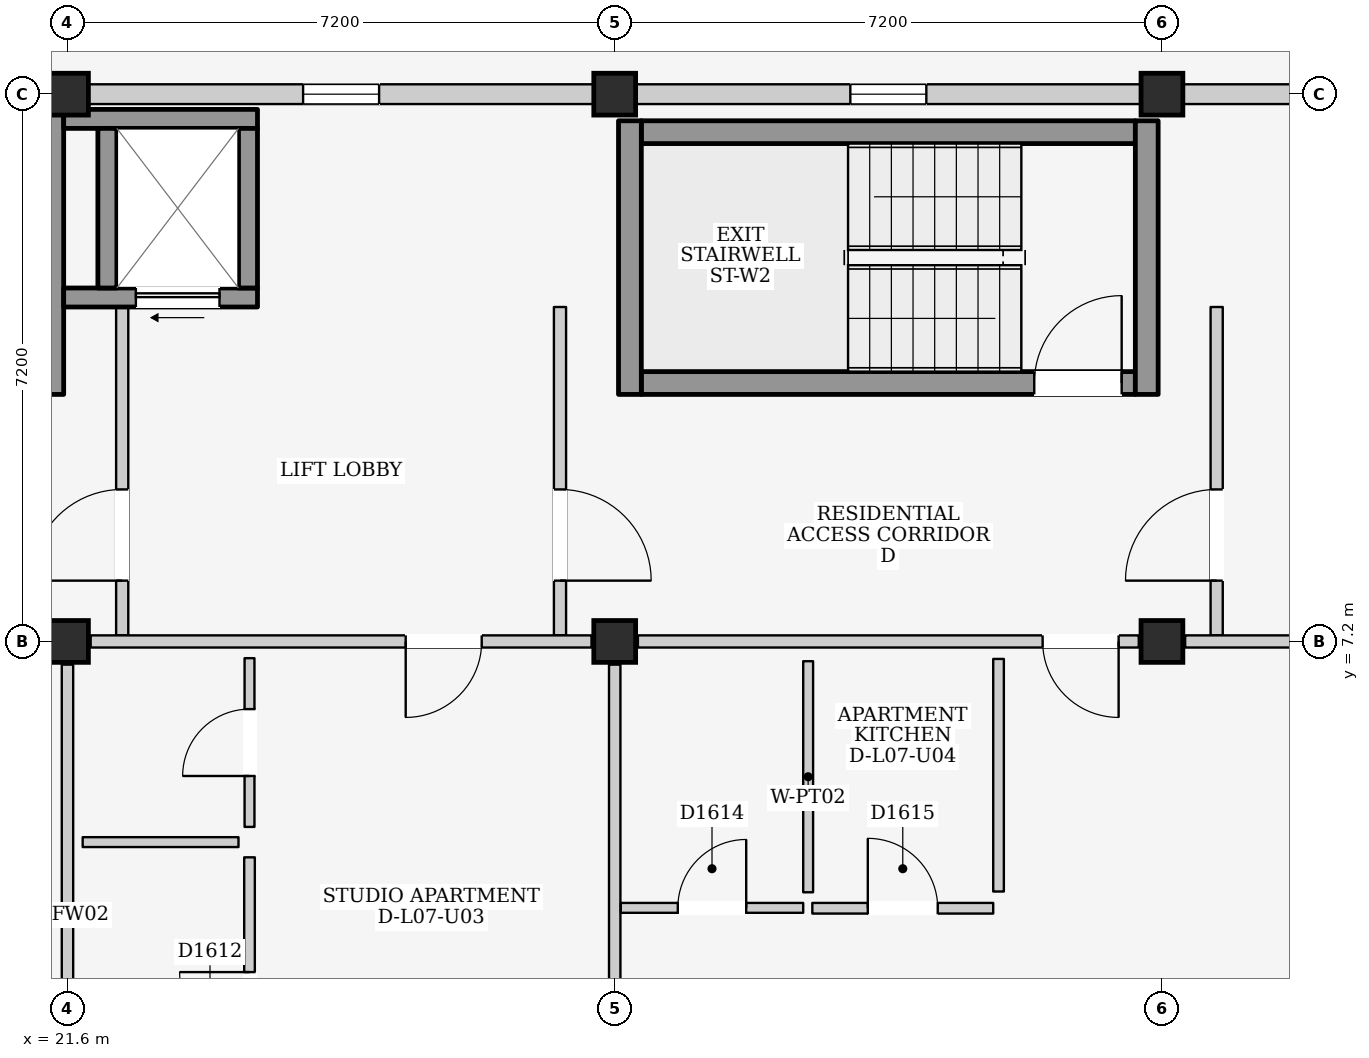
"""IFC4 building model, lengths in metres.
Left out: names, types, materials, properties, quantities, classifications, styles, units other than length and angle.
Written with IfcOpenShell. Run it as: python <this file> out.ifc"""

import sys

from ifc_helpers import new_model, si_unit, direction, frame, frame_2d, origin, origin_2d, place, context, subcontext, project, spatial, rectangle, extrude, element, fill, save


model = new_model("IFC4")
c1 = context("Model", 3, precision=1e-05, world=origin(), true_north=direction((0.0, 1.0)))
c2 = subcontext(c1, "Body", "Model", "MODEL_VIEW")
j1 = project(units=[si_unit("LENGTHUNIT", "METRE"), si_unit("PLANEANGLEUNIT", "RADIAN")], contexts=[c1])
p1 = place(None, origin())
s1 = spatial("IfcSite", under=j1, at=p1, CompositionType="ELEMENT")
p2 = place(p1, origin())
s2 = spatial("IfcBuilding", under=s1, at=p2, CompositionType="ELEMENT")
p3 = place(p2, frame((0.0, 0.0, 25.1)))
s3 = spatial("IfcBuildingStorey", under=s2, at=p3, CompositionType="ELEMENT", Elevation=25.1)
for number, where, z_axis, x_axis in (
    (1, (21.6, 7.2, 0.0), (0.0, 0.0, 1.0), (1.0, 0.0, 0.0)),
    (2, (21.6, 14.4, 0.0), (0.0, 0.0, 1.0), (1.0, 0.0, 0.0)),
    (3, (28.8, 7.2, 0.0), (0.0, 0.0, 1.0), (1.0, 0.0, 0.0)),
    (4, (28.8, 14.4, 0.0), (0.0, 0.0, 1.0), (1.0, 0.0, 0.0)),
    (5, (36.0, 7.2, 0.0), (0.0, 0.0, 1.0), (1.0, 0.0, 0.0)),
    (6, (36.0, 14.4, 0.0), (0.0, 0.0, 1.0), (1.0, 0.0, 0.0)),
):
    element("IfcColumn", number, at=place(p3, frame(where, z_axis=z_axis, x_axis=x_axis)), inside=s3, PredefinedType="COLUMN", context=c2, shape_type="SweptSolid", body=[
        extrude(rectangle(XDim=0.55, YDim=0.55, at=origin_2d()), origin(), (0.0, 0.0, 1.0), 3.2),
    ])
p4 = place(p3, frame((21.875, 14.4, 0.0), z_axis=(0.0, 0.0, 1.0), x_axis=(1.0, 0.0, 0.0)))
e7 = element("IfcWall", 7, at=p4, inside=s3, PredefinedType="ELEMENTEDWALL", context=c2, shape_type="SweptSolid", body=[
    extrude(rectangle(XDim=6.65, YDim=0.26, at=frame_2d((3.325, 0.0))), origin(), (0.0, 0.0, 1.0), 2.375),
])
p5 = place(p4, frame((2.825, 0.0, 1.2)))
e8 = element("IfcOpeningElement", 8, at=p5, cuts=e7, PredefinedType="OPENING", context=c2, shape_type="SweptSolid", body=[
    extrude(rectangle(XDim=1.0, YDim=0.9, at=frame_2d((0.5, 0.45))), frame((0.0, 0.145, 0.0), z_axis=(0.0, -1.0, 0.0), x_axis=(1.0, 0.0, 0.0)), (0.0, 0.0, 1.0), 0.29),
])
p6 = place(p3, frame((29.075, 14.4, 0.0), z_axis=(0.0, 0.0, 1.0), x_axis=(1.0, 0.0, 0.0)))
e9 = element("IfcWall", 9, at=p6, inside=s3, PredefinedType="ELEMENTEDWALL", context=c2, shape_type="SweptSolid", body=[
    extrude(rectangle(XDim=6.65, YDim=0.26, at=frame_2d((3.325, 0.0))), origin(), (0.0, 0.0, 1.0), 2.375),
])
p7 = place(p6, frame((2.825, 0.0, 1.2)))
e10 = element("IfcOpeningElement", 10, at=p7, cuts=e9, PredefinedType="OPENING", context=c2, shape_type="SweptSolid", body=[
    extrude(rectangle(XDim=1.0, YDim=0.9, at=frame_2d((0.5, 0.45))), frame((0.0, 0.145, 0.0), z_axis=(0.0, -1.0, 0.0), x_axis=(1.0, 0.0, 0.0)), (0.0, 0.0, 1.0), 0.29),
])
p8 = place(p3, frame((36.275, 14.4, 0.0), z_axis=(0.0, 0.0, 1.0), x_axis=(1.0, 0.0, 0.0)))
e11 = element("IfcWall", 11, at=p8, inside=s3, PredefinedType="ELEMENTEDWALL", context=c2, shape_type="SweptSolid", body=[
    extrude(rectangle(XDim=6.65, YDim=0.26, at=frame_2d((3.325, 0.0))), origin(), (0.0, 0.0, 1.0), 2.375),
])
p9 = place(p8, frame((2.825, 0.0, 1.2)))
e12 = element("IfcOpeningElement", 12, at=p9, cuts=e11, PredefinedType="OPENING", context=c2, shape_type="SweptSolid", body=[
    extrude(rectangle(XDim=1.0, YDim=0.9, at=frame_2d((0.5, 0.45))), frame((0.0, 0.145, 0.0), z_axis=(0.0, -1.0, 0.0), x_axis=(1.0, 0.0, 0.0)), (0.0, 0.0, 1.0), 0.29),
])
p10 = place(p3, frame((21.4, 10.45, 0.0), z_axis=(0.0, 0.0, 1.0), x_axis=(0.0, 1.0, 0.0)))
e13 = element("IfcWall", 13, at=p10, inside=s3, PredefinedType="SHEAR", context=c2, shape_type="SweptSolid", body=[
    extrude(rectangle(XDim=3.75, YDim=0.3, at=frame_2d((1.875, 0.0))), origin(), (0.0, 0.0, 1.0), 2.99),
])
p11 = place(p3, frame((22.32, 7.28, 0.0), z_axis=(0.0, 0.0, 1.0), x_axis=(0.0, 1.0, 0.0)))
e14 = element("IfcWall", 14, at=p11, inside=s3, PredefinedType="PARTITIONING", context=c2, shape_type="SweptSolid", body=[
    extrude(rectangle(XDim=4.32, YDim=0.16, at=frame_2d((2.16, 0.0))), origin(), (0.0, 0.0, 1.0), 2.99),
])
p12 = place(p11, frame((0.72, 0.0, 0.0)))
e15 = element("IfcOpeningElement", 15, at=p12, cuts=e14, PredefinedType="OPENING", context=c2, shape_type="SweptSolid", body=[
    extrude(rectangle(XDim=1.2, YDim=2.2, at=frame_2d((0.6, 1.1))), frame((0.0, 0.095, 0.0), z_axis=(0.0, -1.0, 0.0), x_axis=(1.0, 0.0, 0.0)), (0.0, 0.0, 1.0), 0.19),
])
p13 = place(p3, frame((28.08, 7.28, 0.0), z_axis=(0.0, 0.0, 1.0), x_axis=(0.0, 1.0, 0.0)))
e16 = element("IfcWall", 16, at=p13, inside=s3, PredefinedType="PARTITIONING", context=c2, shape_type="SweptSolid", body=[
    extrude(rectangle(XDim=4.32, YDim=0.16, at=frame_2d((2.16, 0.0))), origin(), (0.0, 0.0, 1.0), 2.99),
])
p14 = place(p13, frame((0.72, 0.0, 0.0)))
e17 = element("IfcOpeningElement", 17, at=p14, cuts=e16, PredefinedType="OPENING", context=c2, shape_type="SweptSolid", body=[
    extrude(rectangle(XDim=1.2, YDim=2.2, at=frame_2d((0.6, 1.1))), frame((0.0, 0.095, 0.0), z_axis=(0.0, -1.0, 0.0), x_axis=(1.0, 0.0, 0.0)), (0.0, 0.0, 1.0), 0.19),
])
p15 = place(p3, frame((21.55, 11.725, 0.0), z_axis=(0.0, 0.0, 1.0), x_axis=(1.0, 0.0, 0.0)))
e18 = element("IfcWall", 18, at=p15, inside=s3, PredefinedType="SHEAR", context=c2, shape_type="SweptSolid", body=[
    extrude(rectangle(XDim=2.55, YDim=0.25, at=frame_2d((1.275, 0.0))), origin(), (0.0, 0.0, 1.0), 2.99),
])
p16 = place(p15, frame((0.95, 0.0, 0.0)))
e19 = element("IfcOpeningElement", 19, at=p16, cuts=e18, PredefinedType="OPENING", context=c2, shape_type="SweptSolid", body=[
    extrude(rectangle(XDim=1.1, YDim=2.15, at=frame_2d((0.55, 1.075))), frame((0.0, 0.14, 0.0), z_axis=(0.0, -1.0, 0.0), x_axis=(1.0, 0.0, 0.0)), (0.0, 0.0, 1.0), 0.28),
])
p17 = place(p3, frame((21.55, 14.075, 0.0), z_axis=(0.0, 0.0, 1.0), x_axis=(1.0, 0.0, 0.0)))
e20 = element("IfcWall", 20, at=p17, inside=s3, PredefinedType="SHEAR", context=c2, shape_type="SweptSolid", body=[
    extrude(rectangle(XDim=2.55, YDim=0.25, at=frame_2d((1.275, 0.0))), origin(), (0.0, 0.0, 1.0), 2.99),
])
for number, where, z_axis, x_axis in (
    (21, (22.125, 11.85, 0.0), (0.0, 0.0, 1.0), (0.0, 1.0, 0.0)),
    (22, (23.975, 11.85, 0.0), (0.0, 0.0, 1.0), (0.0, 1.0, 0.0)),
):
    element("IfcWall", number, at=place(p3, frame(where, z_axis=z_axis, x_axis=x_axis)), inside=s3, PredefinedType="SHEAR", context=c2, shape_type="SweptSolid", body=[
        extrude(rectangle(XDim=2.1, YDim=0.25, at=frame_2d((1.05, 0.0))), origin(), (0.0, 0.0, 1.0), 2.99),
    ])
p18 = place(p3, frame((29.15, 10.6, 0.0), z_axis=(0.0, 0.0, 1.0), x_axis=(1.0, 0.0, 0.0)))
e23 = element("IfcWall", 23, at=p18, inside=s3, PredefinedType="SHEAR", context=c2, shape_type="SweptSolid", body=[
    extrude(rectangle(XDim=6.5, YDim=0.3, at=frame_2d((3.25, 0.0))), origin(), (0.0, 0.0, 1.0), 2.99),
])
p19 = place(p18, frame((5.17, 0.0, 0.0)))
e24 = element("IfcOpeningElement", 24, at=p19, cuts=e23, PredefinedType="OPENING", context=c2, shape_type="SweptSolid", body=[
    extrude(rectangle(XDim=1.15, YDim=2.2, at=frame_2d((0.575, 1.1))), frame((0.0, 0.165, 0.0), z_axis=(0.0, -1.0, 0.0), x_axis=(1.0, 0.0, 0.0)), (0.0, 0.0, 1.0), 0.33),
])
p20 = place(p3, frame((29.15, 13.9, 0.0), z_axis=(0.0, 0.0, 1.0), x_axis=(1.0, 0.0, 0.0)))
e25 = element("IfcWall", 25, at=p20, inside=s3, PredefinedType="SHEAR", context=c2, shape_type="SweptSolid", body=[
    extrude(rectangle(XDim=6.5, YDim=0.3, at=frame_2d((3.25, 0.0))), origin(), (0.0, 0.0, 1.0), 2.99),
])
for number, where, z_axis, x_axis in (
    (26, (29.0, 10.45, 0.0), (0.0, 0.0, 1.0), (0.0, 1.0, 0.0)),
    (27, (35.8, 10.45, 0.0), (0.0, 0.0, 1.0), (0.0, 1.0, 0.0)),
):
    element("IfcWall", number, at=place(p3, frame(where, z_axis=z_axis, x_axis=x_axis)), inside=s3, PredefinedType="SHEAR", context=c2, shape_type="SweptSolid", body=[
        extrude(rectangle(XDim=3.6, YDim=0.3, at=frame_2d((1.8, 0.0))), origin(), (0.0, 0.0, 1.0), 2.99),
    ])
p21 = place(p3, frame((36.72, 7.28, 0.0), z_axis=(0.0, 0.0, 1.0), x_axis=(0.0, 1.0, 0.0)))
e28 = element("IfcWall", 28, at=p21, inside=s3, PredefinedType="PARTITIONING", context=c2, shape_type="SweptSolid", body=[
    extrude(rectangle(XDim=4.32, YDim=0.16, at=frame_2d((2.16, 0.0))), origin(), (0.0, 0.0, 1.0), 2.99),
])
p22 = place(p21, frame((0.72, 0.0, 0.0)))
e29 = element("IfcOpeningElement", 29, at=p22, cuts=e28, PredefinedType="OPENING", context=c2, shape_type="SweptSolid", body=[
    extrude(rectangle(XDim=1.2, YDim=2.2, at=frame_2d((0.6, 1.1))), frame((0.0, 0.095, 0.0), z_axis=(0.0, -1.0, 0.0), x_axis=(1.0, 0.0, 0.0)), (0.0, 0.0, 1.0), 0.19),
])
p23 = place(p3, frame((21.6, 0.305, 0.0), z_axis=(0.0, 0.0, 1.0), x_axis=(0.0, 1.0, 0.0)))
e30 = element("IfcWall", 30, at=p23, inside=s3, PredefinedType="PARTITIONING", context=c2, shape_type="SweptSolid", body=[
    extrude(rectangle(XDim=6.59, YDim=0.15, at=frame_2d((3.295, 0.0))), origin(), (0.0, 0.0, 1.0), 2.475),
])
p24 = place(p3, frame((21.905, 7.2, 0.0), z_axis=(0.0, 0.0, 1.0), x_axis=(1.0, 0.0, 0.0)))
e31 = element("IfcWall", 31, at=p24, inside=s3, PredefinedType="PARTITIONING", context=c2, shape_type="SweptSolid", body=[
    extrude(rectangle(XDim=6.59, YDim=0.16, at=frame_2d((3.295, 0.0))), origin(), (0.0, 0.0, 1.0), 2.375),
])
p25 = place(p24, frame((4.145, 0.0, 0.0)))
e32 = element("IfcOpeningElement", 32, at=p25, cuts=e31, PredefinedType="OPENING", context=c2, shape_type="SweptSolid", body=[
    extrude(rectangle(XDim=1.0, YDim=2.15, at=frame_2d((0.5, 1.075))), frame((0.0, 0.095, 0.0), z_axis=(0.0, -1.0, 0.0), x_axis=(1.0, 0.0, 0.0)), (0.0, 0.0, 1.0), 0.19),
])
p26 = place(p3, frame((28.8, 0.305, 0.0), z_axis=(0.0, 0.0, 1.0), x_axis=(0.0, 1.0, 0.0)))
e33 = element("IfcWall", 33, at=p26, inside=s3, PredefinedType="PARTITIONING", context=c2, shape_type="SweptSolid", body=[
    extrude(rectangle(XDim=6.59, YDim=0.15, at=frame_2d((3.295, 0.0))), origin(), (0.0, 0.0, 1.0), 2.475),
])
p27 = place(p3, frame((21.8, 4.56, 0.0), z_axis=(0.0, 0.0, 1.0), x_axis=(1.0, 0.0, 0.0)))
e34 = element("IfcWall", 34, at=p27, inside=s3, PredefinedType="PARTITIONING", context=c2, shape_type="SweptSolid", body=[
    extrude(rectangle(XDim=2.05, YDim=0.13, at=frame_2d((1.025, 0.0))), origin(), (0.0, 0.0, 1.0), 2.99),
])
p28 = place(p3, frame((23.995, 4.76, 0.0), z_axis=(0.0, 0.0, 1.0), x_axis=(0.0, 1.0, 0.0)))
e35 = element("IfcWall", 35, at=p28, inside=s3, PredefinedType="PARTITIONING", context=c2, shape_type="SweptSolid", body=[
    extrude(rectangle(XDim=2.22, YDim=0.13, at=frame_2d((1.11, 0.0))), origin(), (0.0, 0.0, 1.0), 2.99),
])
p29 = place(p28, frame((0.67, 0.0, 0.0)))
e36 = element("IfcOpeningElement", 36, at=p29, cuts=e35, PredefinedType="OPENING", context=c2, shape_type="SweptSolid", body=[
    extrude(rectangle(XDim=0.88, YDim=2.1, at=frame_2d((0.44, 1.05))), frame((0.0, 0.08, 0.0), z_axis=(0.0, -1.0, 0.0), x_axis=(1.0, 0.0, 0.0)), (0.0, 0.0, 1.0), 0.16),
])
p30 = place(p3, frame((23.995, 0.42, 0.0), z_axis=(0.0, 0.0, 1.0), x_axis=(0.0, 1.0, 0.0)))
e37 = element("IfcWall", 37, at=p30, inside=s3, PredefinedType="PARTITIONING", context=c2, shape_type="SweptSolid", body=[
    extrude(rectangle(XDim=3.94, YDim=0.14, at=frame_2d((1.97, 0.0))), origin(), (0.0, 0.0, 1.0), 2.99),
])
p31 = place(p30, frame((1.51, 0.0, 0.0)))
e38 = element("IfcOpeningElement", 38, at=p31, cuts=e37, PredefinedType="OPENING", context=c2, shape_type="SweptSolid", body=[
    extrude(rectangle(XDim=0.92, YDim=2.1, at=frame_2d((0.46, 1.05))), frame((0.0, 0.085, 0.0), z_axis=(0.0, -1.0, 0.0), x_axis=(1.0, 0.0, 0.0)), (0.0, 0.0, 1.0), 0.17),
])
p32 = place(p3, frame((29.105, 7.2, 0.0), z_axis=(0.0, 0.0, 1.0), x_axis=(1.0, 0.0, 0.0)))
e39 = element("IfcWall", 39, at=p32, inside=s3, PredefinedType="PARTITIONING", context=c2, shape_type="SweptSolid", body=[
    extrude(rectangle(XDim=6.59, YDim=0.16, at=frame_2d((3.295, 0.0))), origin(), (0.0, 0.0, 1.0), 2.375),
])
p33 = place(p32, frame((5.325, 0.0, 0.0)))
e40 = element("IfcOpeningElement", 40, at=p33, cuts=e39, PredefinedType="OPENING", context=c2, shape_type="SweptSolid", body=[
    extrude(rectangle(XDim=1.0, YDim=2.15, at=frame_2d((0.5, 1.075))), frame((0.0, 0.095, 0.0), z_axis=(0.0, -1.0, 0.0), x_axis=(1.0, 0.0, 0.0)), (0.0, 0.0, 1.0), 0.19),
])
p34 = place(p3, frame((36.305, 7.2, 0.0), z_axis=(0.0, 0.0, 1.0), x_axis=(1.0, 0.0, 0.0)))
e41 = element("IfcWall", 41, at=p34, inside=s3, PredefinedType="PARTITIONING", context=c2, shape_type="SweptSolid", body=[
    extrude(rectangle(XDim=6.59, YDim=0.16, at=frame_2d((3.295, 0.0))), origin(), (0.0, 0.0, 1.0), 2.375),
])
p35 = place(p3, frame((28.88, 3.695, 0.0), z_axis=(0.0, 0.0, 1.0), x_axis=(1.0, 0.0, 0.0)))
e42 = element("IfcWall", 42, at=p35, inside=s3, PredefinedType="PARTITIONING", context=c2, shape_type="SweptSolid", body=[
    extrude(rectangle(XDim=2.4, YDim=0.13, at=frame_2d((1.2, 0.0))), origin(), (0.0, 0.0, 1.0), 2.99),
])
p36 = place(p35, frame((0.75, 0.0, 0.0)))
e43 = element("IfcOpeningElement", 43, at=p36, cuts=e42, PredefinedType="OPENING", context=c2, shape_type="SweptSolid", body=[
    extrude(rectangle(XDim=0.9, YDim=2.1, at=frame_2d((0.45, 1.05))), frame((0.0, 0.08, 0.0), z_axis=(0.0, -1.0, 0.0), x_axis=(1.0, 0.0, 0.0)), (0.0, 0.0, 1.0), 0.16),
])
p37 = place(p3, frame((31.345, 3.9, 0.0), z_axis=(0.0, 0.0, 1.0), x_axis=(0.0, 1.0, 0.0)))
e44 = element("IfcWall", 44, at=p37, inside=s3, PredefinedType="PARTITIONING", context=c2, shape_type="SweptSolid", body=[
    extrude(rectangle(XDim=3.04, YDim=0.13, at=frame_2d((1.52, 0.0))), origin(), (0.0, 0.0, 1.0), 2.99),
])
p38 = place(p3, frame((31.4, 3.69, 0.0), z_axis=(0.0, 0.0, 1.0), x_axis=(1.0, 0.0, 0.0)))
e45 = element("IfcWall", 45, at=p38, inside=s3, PredefinedType="PARTITIONING", context=c2, shape_type="SweptSolid", body=[
    extrude(rectangle(XDim=2.38, YDim=0.14, at=frame_2d((1.19, 0.0))), origin(), (0.0, 0.0, 1.0), 2.99),
])
p39 = place(p38, frame((0.73, 0.0, 0.0)))
e46 = element("IfcOpeningElement", 46, at=p39, cuts=e45, PredefinedType="OPENING", context=c2, shape_type="SweptSolid", body=[
    extrude(rectangle(XDim=0.92, YDim=2.1, at=frame_2d((0.46, 1.05))), frame((0.0, 0.085, 0.0), z_axis=(0.0, -1.0, 0.0), x_axis=(1.0, 0.0, 0.0)), (0.0, 0.0, 1.0), 0.17),
])
p40 = place(p3, frame((33.85, 3.91, 0.0), z_axis=(0.0, 0.0, 1.0), x_axis=(0.0, 1.0, 0.0)))
e47 = element("IfcWall", 47, at=p40, inside=s3, PredefinedType="PARTITIONING", context=c2, shape_type="SweptSolid", body=[
    extrude(rectangle(XDim=3.06, YDim=0.14, at=frame_2d((1.53, 0.0))), origin(), (0.0, 0.0, 1.0), 2.99),
])
p41 = place(p5, origin())
e48 = element("IfcWindow", 48, at=p41, inside=s3, PartitioningType="SINGLE_PANEL", PredefinedType="WINDOW", context=c2, shape_type="SweptSolid", body=[
    extrude(rectangle(XDim=1.0, YDim=0.9, at=frame_2d((0.5, 0.45))), frame((0.0, 0.03, 0.0), z_axis=(0.0, -1.0, 0.0), x_axis=(1.0, 0.0, 0.0)), (0.0, 0.0, 1.0), 0.06),
])
fill(e8, e48)
p42 = place(p7, origin())
e49 = element("IfcWindow", 49, at=p42, inside=s3, PartitioningType="SINGLE_PANEL", PredefinedType="WINDOW", context=c2, shape_type="SweptSolid", body=[
    extrude(rectangle(XDim=1.0, YDim=0.9, at=frame_2d((0.5, 0.45))), frame((0.0, 0.03, 0.0), z_axis=(0.0, -1.0, 0.0), x_axis=(1.0, 0.0, 0.0)), (0.0, 0.0, 1.0), 0.06),
])
fill(e10, e49)
p43 = place(p12, origin())
e50 = element("IfcDoor", 50, at=p43, inside=s3, OperationType="SINGLE_SWING_LEFT", PredefinedType="DOOR", context=c2, shape_type="SweptSolid", body=[
    extrude(rectangle(XDim=1.2, YDim=2.2, at=frame_2d((0.6, 1.1))), frame((0.0, 0.025, 0.0), z_axis=(0.0, -1.0, 0.0), x_axis=(1.0, 0.0, 0.0)), (0.0, 0.0, 1.0), 0.05),
])
fill(e15, e50)
p44 = place(p14, frame((1.2, 0.0, 0.0), z_axis=(0.0, 0.0, 1.0), x_axis=(-1.0, 0.0, 0.0)))
e51 = element("IfcDoor", 51, at=p44, inside=s3, OperationType="SINGLE_SWING_RIGHT", PredefinedType="DOOR", context=c2, shape_type="SweptSolid", body=[
    extrude(rectangle(XDim=1.2, YDim=2.2, at=frame_2d((0.6, 1.1))), frame((0.0, 0.025, 0.0), z_axis=(0.0, -1.0, 0.0), x_axis=(1.0, 0.0, 0.0)), (0.0, 0.0, 1.0), 0.05),
])
fill(e17, e51)
p45 = place(p16, frame((1.1, 0.0, 0.0), z_axis=(0.0, 0.0, 1.0), x_axis=(-1.0, 0.0, 0.0)))
e52 = element("IfcDoor", 52, at=p45, inside=s3, OperationType="SLIDING_TO_LEFT", PredefinedType="DOOR", context=c2, shape_type="SweptSolid", body=[
    extrude(rectangle(XDim=1.1, YDim=2.15, at=frame_2d((0.55, 1.075))), frame((0.0, 0.025, 0.0), z_axis=(0.0, -1.0, 0.0), x_axis=(1.0, 0.0, 0.0)), (0.0, 0.0, 1.0), 0.05),
])
fill(e19, e52)
p46 = place(p19, origin())
e53 = element("IfcDoor", 53, at=p46, inside=s3, OperationType="SINGLE_SWING_RIGHT", PredefinedType="DOOR", context=c2, shape_type="SweptSolid", body=[
    extrude(rectangle(XDim=1.15, YDim=2.2, at=frame_2d((0.575, 1.1))), frame((0.0, 0.025, 0.0), z_axis=(0.0, -1.0, 0.0), x_axis=(1.0, 0.0, 0.0)), (0.0, 0.0, 1.0), 0.05),
])
fill(e24, e53)
p47 = place(p22, origin())
e54 = element("IfcDoor", 54, at=p47, inside=s3, OperationType="SINGLE_SWING_LEFT", PredefinedType="DOOR", context=c2, shape_type="SweptSolid", body=[
    extrude(rectangle(XDim=1.2, YDim=2.2, at=frame_2d((0.6, 1.1))), frame((0.0, 0.025, 0.0), z_axis=(0.0, -1.0, 0.0), x_axis=(1.0, 0.0, 0.0)), (0.0, 0.0, 1.0), 0.05),
])
fill(e29, e54)
p48 = place(p25, frame((1.0, 0.0, 0.0), z_axis=(0.0, 0.0, 1.0), x_axis=(-1.0, 0.0, 0.0)))
e55 = element("IfcDoor", 55, at=p48, inside=s3, OperationType="SINGLE_SWING_RIGHT", PredefinedType="DOOR", context=c2, shape_type="SweptSolid", body=[
    extrude(rectangle(XDim=1.0, YDim=2.15, at=frame_2d((0.5, 1.075))), frame((0.0, 0.025, 0.0), z_axis=(0.0, -1.0, 0.0), x_axis=(1.0, 0.0, 0.0)), (0.0, 0.0, 1.0), 0.05),
])
fill(e32, e55)
p49 = place(p29, origin())
e56 = element("IfcDoor", 56, at=p49, inside=s3, OperationType="SINGLE_SWING_LEFT", PredefinedType="DOOR", context=c2, shape_type="SweptSolid", body=[
    extrude(rectangle(XDim=0.88, YDim=2.1, at=frame_2d((0.44, 1.05))), frame((0.0, 0.025, 0.0), z_axis=(0.0, -1.0, 0.0), x_axis=(1.0, 0.0, 0.0)), (0.0, 0.0, 1.0), 0.05),
])
fill(e36, e56)
p50 = place(p31, origin())
e57 = element("IfcDoor", 57, at=p50, inside=s3, OperationType="SINGLE_SWING_RIGHT", PredefinedType="DOOR", context=c2, shape_type="SweptSolid", body=[
    extrude(rectangle(XDim=0.92, YDim=2.1, at=frame_2d((0.46, 1.05))), frame((0.0, 0.025, 0.0), z_axis=(0.0, -1.0, 0.0), x_axis=(1.0, 0.0, 0.0)), (0.0, 0.0, 1.0), 0.05),
])
fill(e38, e57)
p51 = place(p33, frame((1.0, 0.0, 0.0), z_axis=(0.0, 0.0, 1.0), x_axis=(-1.0, 0.0, 0.0)))
e58 = element("IfcDoor", 58, at=p51, inside=s3, OperationType="SINGLE_SWING_LEFT", PredefinedType="DOOR", context=c2, shape_type="SweptSolid", body=[
    extrude(rectangle(XDim=1.0, YDim=2.15, at=frame_2d((0.5, 1.075))), frame((0.0, 0.025, 0.0), z_axis=(0.0, -1.0, 0.0), x_axis=(1.0, 0.0, 0.0)), (0.0, 0.0, 1.0), 0.05),
])
fill(e40, e58)
p52 = place(p36, origin())
e59 = element("IfcDoor", 59, at=p52, inside=s3, OperationType="SINGLE_SWING_RIGHT", PredefinedType="DOOR", context=c2, shape_type="SweptSolid", body=[
    extrude(rectangle(XDim=0.9, YDim=2.1, at=frame_2d((0.45, 1.05))), frame((0.0, 0.025, 0.0), z_axis=(0.0, -1.0, 0.0), x_axis=(1.0, 0.0, 0.0)), (0.0, 0.0, 1.0), 0.05),
])
fill(e43, e59)
p53 = place(p39, origin())
e60 = element("IfcDoor", 60, at=p53, inside=s3, OperationType="SINGLE_SWING_LEFT", PredefinedType="DOOR", context=c2, shape_type="SweptSolid", body=[
    extrude(rectangle(XDim=0.92, YDim=2.1, at=frame_2d((0.46, 1.05))), frame((0.0, 0.025, 0.0), z_axis=(0.0, -1.0, 0.0), x_axis=(1.0, 0.0, 0.0)), (0.0, 0.0, 1.0), 0.05),
])
fill(e46, e60)
save(model, sys.argv[1])
